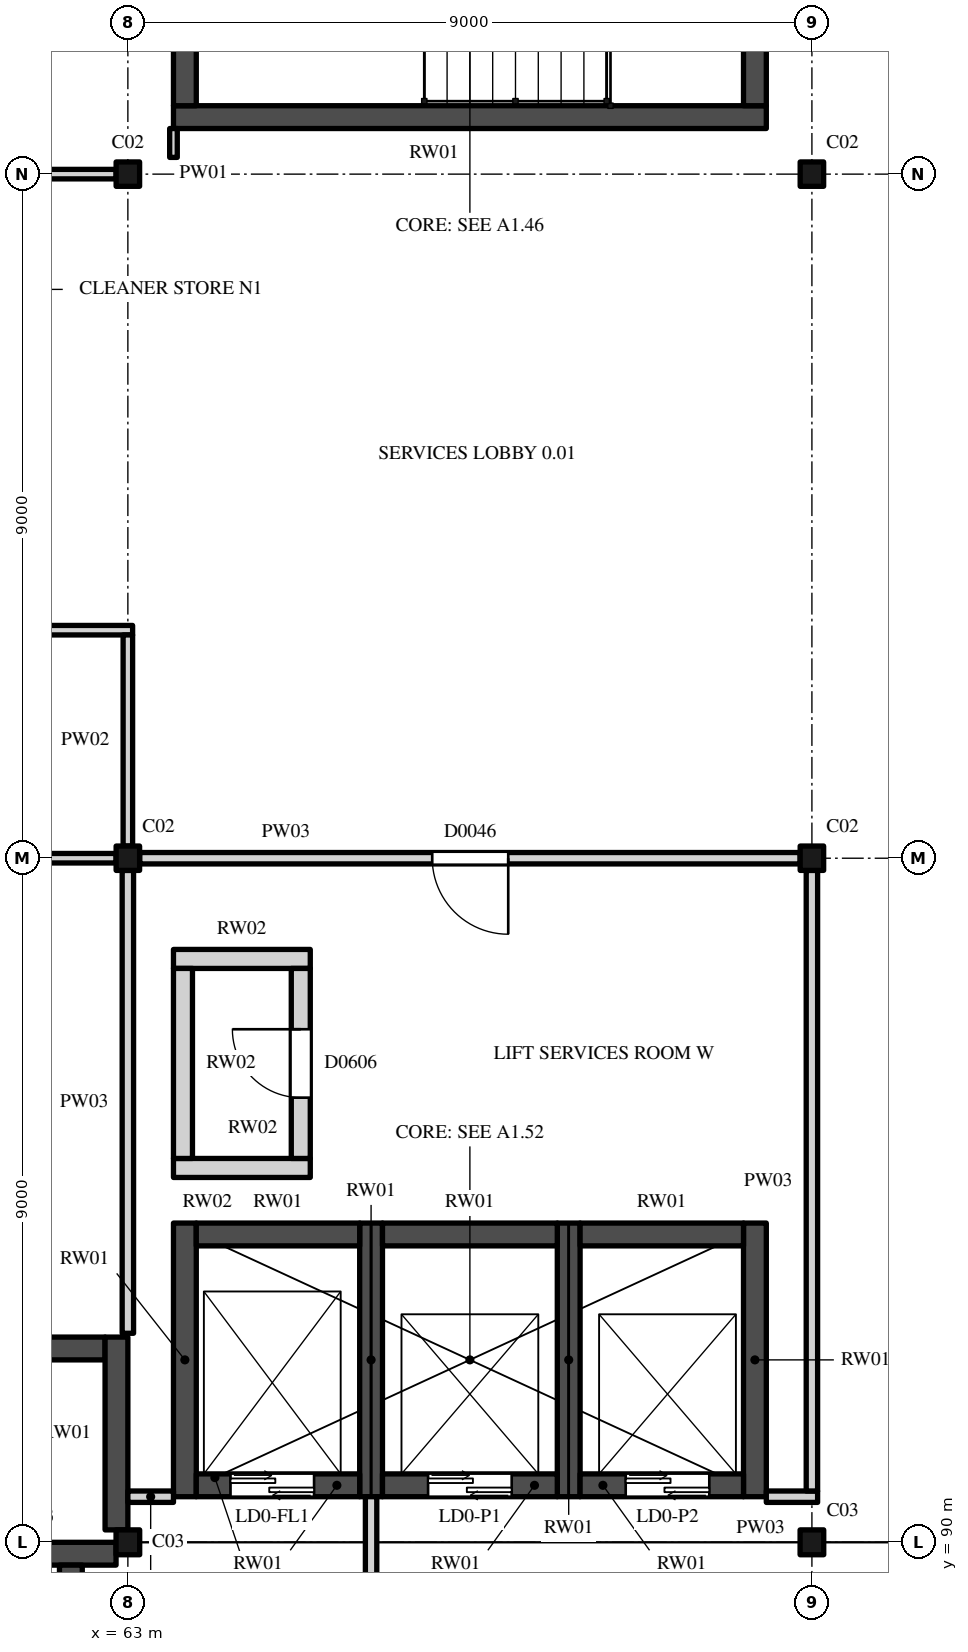
"""IFC4 building model, lengths in metres.
Left out: names, types, materials, properties, quantities, classifications, styles, units other than length and angle.
Written with IfcOpenShell. Run it as: python <this file> out.ifc"""

import sys

from ifc_helpers import new_model, si_unit, direction, frame, frame_2d, origin, origin_2d, place, context, subcontext, project, spatial, rectangle, i_section, extrude, element, fill, save


model = new_model("IFC4")
c1 = context("Model", 3, precision=1e-05, world=origin(), true_north=direction((0.0, 1.0)))
c2 = subcontext(c1, "Body", "Model", "MODEL_VIEW")
j1 = project(units=[si_unit("LENGTHUNIT", "METRE"), si_unit("PLANEANGLEUNIT", "RADIAN")], contexts=[c1])
p1 = place(None, origin())
s1 = spatial("IfcSite", under=j1, at=p1, CompositionType="ELEMENT")
p2 = place(p1, origin())
s2 = spatial("IfcBuilding", under=s1, at=p2, CompositionType="ELEMENT")
p3 = place(p2, origin())
s3 = spatial("IfcBuildingStorey", under=s2, at=p3, CompositionType="ELEMENT", Elevation=0.0)
for number, where, z_axis, x_axis in (
    (1, (63.0, 90.0, 0.0), (0.0, 0.0, 1.0), (1.0, 0.0, 0.0)),
    (2, (72.0, 90.0, 0.0), (0.0, 0.0, 1.0), (1.0, 0.0, 0.0)),
):
    element("IfcColumn", number, at=place(p3, frame(where, z_axis=z_axis, x_axis=x_axis)), inside=s3, PredefinedType="COLUMN", context=c2, shape_type="SweptSolid", body=[
        extrude(i_section(OverallWidth=0.311, OverallDepth=0.327, WebThickness=0.016, FlangeThickness=0.025, FilletRadius=0.017, at=origin_2d()), origin(), (0.0, 0.0, 1.0), 6.0),
    ])
for number, where, z_axis, x_axis in (
    (3, (63.0, 99.0, 0.0), (0.0, 0.0, 1.0), (1.0, 0.0, 0.0)),
    (4, (72.0, 99.0, 0.0), (0.0, 0.0, 1.0), (1.0, 0.0, 0.0)),
    (5, (63.0, 108.0, 0.0), (0.0, 0.0, 1.0), (1.0, 0.0, 0.0)),
    (6, (72.0, 108.0, 0.0), (0.0, 0.0, 1.0), (1.0, 0.0, 0.0)),
):
    element("IfcColumn", number, at=place(p3, frame(where, z_axis=z_axis, x_axis=x_axis)), inside=s3, PredefinedType="COLUMN", context=c2, shape_type="SweptSolid", body=[
        extrude(i_section(OverallWidth=0.309, OverallDepth=0.321, WebThickness=0.014, FlangeThickness=0.022, FilletRadius=0.017, at=origin_2d()), origin(), (0.0, 0.0, 1.0), 6.0),
    ])
p4 = place(p3, frame((54.3, 89.85, 0.0), z_axis=(0.0, 0.0, 1.0), x_axis=(1.0, 0.0, 0.0)))
e7 = element("IfcWall", 7, at=p4, inside=s3, PredefinedType="SHEAR", context=c2, shape_type="SweptSolid", body=[
    extrude(rectangle(XDim=8.544, YDim=0.3, at=frame_2d((4.272, 0.0))), origin(), (0.0, 0.0, 1.0), 6.0),
])
p5 = place(p4, frame((6.3, 0.0, 0.0)))
e8 = element("IfcOpeningElement", 8, at=p5, cuts=e7, PredefinedType="OPENING", context=c2, shape_type="SweptSolid", body=[
    extrude(rectangle(XDim=1.2, YDim=2.1, at=frame_2d((0.6, 1.05))), frame((0.0, 0.16, 0.0), z_axis=(0.0, -1.0, 0.0), x_axis=(1.0, 0.0, 0.0)), (0.0, 0.0, 1.0), 0.32),
])
p6 = place(p3, frame((62.25, 81.9, 0.0), z_axis=(0.0, 0.0, 1.0), x_axis=(0.0, 1.0, 0.0)))
e9 = element("IfcWall", 9, at=p6, inside=s3, PredefinedType="SHEAR", context=c2, shape_type="SweptSolid", body=[
    extrude(rectangle(XDim=7.8, YDim=0.3, at=frame_2d((3.9, 0.0))), origin(), (0.0, 0.0, 1.0), 6.0),
])
p7 = place(p6, frame((3.0, 0.0, 0.0)))
e10 = element("IfcOpeningElement", 10, at=p7, cuts=e9, PredefinedType="OPENING", context=c2, shape_type="SweptSolid", body=[
    extrude(rectangle(XDim=1.2, YDim=2.1, at=frame_2d((0.6, 1.05))), frame((0.0, 0.16, 0.0), z_axis=(0.0, -1.0, 0.0), x_axis=(1.0, 0.0, 0.0)), (0.0, 0.0, 1.0), 0.32),
])
p8 = place(p3, frame((63.6, 108.75, 0.0), z_axis=(0.0, 0.0, 1.0), x_axis=(1.0, 0.0, 0.0)))
e11 = element("IfcWall", 11, at=p8, inside=s3, PredefinedType="SHEAR", context=c2, shape_type="SweptSolid", body=[
    extrude(rectangle(XDim=7.8, YDim=0.3, at=frame_2d((3.9, 0.0))), origin(), (0.0, 0.0, 1.0), 6.0),
])
p9 = place(p3, frame((63.75, 108.9, 0.0), z_axis=(0.0, 0.0, 1.0), x_axis=(0.0, 1.0, 0.0)))
e12 = element("IfcWall", 12, at=p9, inside=s3, PredefinedType="SHEAR", context=c2, shape_type="SweptSolid", body=[
    extrude(rectangle(XDim=7.8, YDim=0.3, at=frame_2d((3.9, 0.0))), origin(), (0.0, 0.0, 1.0), 6.0),
])
p10 = place(p3, frame((71.25, 108.9, 0.0), z_axis=(0.0, 0.0, 1.0), x_axis=(0.0, 1.0, 0.0)))
e13 = element("IfcWall", 13, at=p10, inside=s3, PredefinedType="SHEAR", context=c2, shape_type="SweptSolid", body=[
    extrude(rectangle(XDim=7.8, YDim=0.3, at=frame_2d((3.9, 0.0))), origin(), (0.0, 0.0, 1.0), 6.0),
])
p11 = place(p10, frame((3.0, 0.0, 0.0)))
e14 = element("IfcOpeningElement", 14, at=p11, cuts=e13, PredefinedType="OPENING", context=c2, shape_type="SweptSolid", body=[
    extrude(rectangle(XDim=1.2, YDim=2.1, at=frame_2d((0.6, 1.05))), frame((0.0, 0.16, 0.0), z_axis=(0.0, -1.0, 0.0), x_axis=(1.0, 0.0, 0.0)), (0.0, 0.0, 1.0), 0.32),
])
p12 = place(p3, frame((54.3, 92.55, 0.0), z_axis=(0.0, 0.0, 1.0), x_axis=(1.0, 0.0, 0.0)))
e15 = element("IfcWall", 15, at=p12, inside=s3, PredefinedType="SHEAR", context=c2, shape_type="SweptSolid", body=[
    extrude(rectangle(XDim=8.4, YDim=0.3, at=frame_2d((4.2, 0.0))), origin(), (0.0, 0.0, 1.0), 6.0),
])
p13 = place(p3, frame((62.85, 90.164, 0.0), z_axis=(0.0, 0.0, 1.0), x_axis=(0.0, 1.0, 0.0)))
e16 = element("IfcWall", 16, at=p13, inside=s3, PredefinedType="SHEAR", context=c2, shape_type="SweptSolid", body=[
    extrude(rectangle(XDim=2.536, YDim=0.3, at=frame_2d((1.268, 0.0))), origin(), (0.0, 0.0, 1.0), 6.0),
])
for number, where, z_axis, x_axis in (
    (17, (63.75, 90.6, -1.5), (0.0, 0.0, 1.0), (0.0, 1.0, 0.0)),
    (18, (66.2, 90.6, -1.5), (0.0, 0.0, 1.0), (0.0, 1.0, 0.0)),
    (19, (68.8, 90.6, -1.5), (0.0, 0.0, 1.0), (0.0, 1.0, 0.0)),
    (20, (71.25, 90.6, -1.5), (0.0, 0.0, 1.0), (0.0, 1.0, 0.0)),
):
    element("IfcWall", number, at=place(p3, frame(where, z_axis=z_axis, x_axis=x_axis)), inside=s3, PredefinedType="SHEAR", context=c2, shape_type="SweptSolid", body=[
        extrude(rectangle(XDim=3.6, YDim=0.3, at=frame_2d((1.8, 0.0))), origin(), (0.0, 0.0, 1.0), 7.5),
    ])
p14 = place(p3, frame((63.9, 90.75, -1.5), z_axis=(0.0, 0.0, 1.0), x_axis=(1.0, 0.0, 0.0)))
e21 = element("IfcWall", 21, at=p14, inside=s3, PredefinedType="SHEAR", context=c2, shape_type="SweptSolid", body=[
    extrude(rectangle(XDim=2.15, YDim=0.3, at=frame_2d((1.075, 0.0))), origin(), (0.0, 0.0, 1.0), 7.5),
])
p15 = place(p14, frame((0.45, 0.0, 1.5)))
e22 = element("IfcOpeningElement", 22, at=p15, cuts=e21, PredefinedType="OPENING", context=c2, shape_type="SweptSolid", body=[
    extrude(rectangle(XDim=1.1, YDim=2.1, at=frame_2d((0.55, 1.05))), frame((0.0, 0.16, 0.0), z_axis=(0.0, -1.0, 0.0), x_axis=(1.0, 0.0, 0.0)), (0.0, 0.0, 1.0), 0.32),
])
p16 = place(p3, frame((63.9, 94.05, -1.5), z_axis=(0.0, 0.0, 1.0), x_axis=(1.0, 0.0, 0.0)))
e23 = element("IfcWall", 23, at=p16, inside=s3, PredefinedType="SHEAR", context=c2, shape_type="SweptSolid", body=[
    extrude(rectangle(XDim=2.15, YDim=0.3, at=frame_2d((1.075, 0.0))), origin(), (0.0, 0.0, 1.0), 7.5),
])
p17 = place(p3, frame((66.35, 90.75, -1.5), z_axis=(0.0, 0.0, 1.0), x_axis=(1.0, 0.0, 0.0)))
e24 = element("IfcWall", 24, at=p17, inside=s3, PredefinedType="SHEAR", context=c2, shape_type="SweptSolid", body=[
    extrude(rectangle(XDim=2.3, YDim=0.3, at=frame_2d((1.15, 0.0))), origin(), (0.0, 0.0, 1.0), 7.5),
])
p18 = place(p17, frame((0.6, 0.0, 1.5)))
e25 = element("IfcOpeningElement", 25, at=p18, cuts=e24, PredefinedType="OPENING", context=c2, shape_type="SweptSolid", body=[
    extrude(rectangle(XDim=1.1, YDim=2.1, at=frame_2d((0.55, 1.05))), frame((0.0, 0.16, 0.0), z_axis=(0.0, -1.0, 0.0), x_axis=(1.0, 0.0, 0.0)), (0.0, 0.0, 1.0), 0.32),
])
p19 = place(p3, frame((66.35, 94.05, -1.5), z_axis=(0.0, 0.0, 1.0), x_axis=(1.0, 0.0, 0.0)))
e26 = element("IfcWall", 26, at=p19, inside=s3, PredefinedType="SHEAR", context=c2, shape_type="SweptSolid", body=[
    extrude(rectangle(XDim=2.3, YDim=0.3, at=frame_2d((1.15, 0.0))), origin(), (0.0, 0.0, 1.0), 7.5),
])
p20 = place(p3, frame((68.95, 90.75, -1.5), z_axis=(0.0, 0.0, 1.0), x_axis=(1.0, 0.0, 0.0)))
e27 = element("IfcWall", 27, at=p20, inside=s3, PredefinedType="SHEAR", context=c2, shape_type="SweptSolid", body=[
    extrude(rectangle(XDim=2.15, YDim=0.3, at=frame_2d((1.075, 0.0))), origin(), (0.0, 0.0, 1.0), 7.5),
])
p21 = place(p20, frame((0.6, 0.0, 1.5)))
e28 = element("IfcOpeningElement", 28, at=p21, cuts=e27, PredefinedType="OPENING", context=c2, shape_type="SweptSolid", body=[
    extrude(rectangle(XDim=1.1, YDim=2.1, at=frame_2d((0.55, 1.05))), frame((0.0, 0.16, 0.0), z_axis=(0.0, -1.0, 0.0), x_axis=(1.0, 0.0, 0.0)), (0.0, 0.0, 1.0), 0.32),
])
p22 = place(p3, frame((68.95, 94.05, -1.5), z_axis=(0.0, 0.0, 1.0), x_axis=(1.0, 0.0, 0.0)))
e29 = element("IfcWall", 29, at=p22, inside=s3, PredefinedType="SHEAR", context=c2, shape_type="SweptSolid", body=[
    extrude(rectangle(XDim=2.15, YDim=0.3, at=frame_2d((1.075, 0.0))), origin(), (0.0, 0.0, 1.0), 7.5),
])
for number, where, z_axis, x_axis in (
    (30, (63.6, 94.925, 0.0), (0.0, 0.0, 1.0), (1.0, 0.0, 0.0)),
    (31, (63.6, 97.675, 0.0), (0.0, 0.0, 1.0), (1.0, 0.0, 0.0)),
):
    element("IfcWall", number, at=place(p3, frame(where, z_axis=z_axis, x_axis=x_axis)), inside=s3, PredefinedType="STANDARD", context=c2, shape_type="SweptSolid", body=[
        extrude(rectangle(XDim=1.8, YDim=0.25, at=frame_2d((0.9, 0.0))), origin(), (0.0, 0.0, 1.0), 6.0),
    ])
p23 = place(p3, frame((63.725, 95.05, 0.0), z_axis=(0.0, 0.0, 1.0), x_axis=(0.0, 1.0, 0.0)))
e32 = element("IfcWall", 32, at=p23, inside=s3, PredefinedType="STANDARD", context=c2, shape_type="SweptSolid", body=[
    extrude(rectangle(XDim=2.5, YDim=0.25, at=frame_2d((1.25, 0.0))), origin(), (0.0, 0.0, 1.0), 6.0),
])
p24 = place(p3, frame((65.275, 95.05, 0.0), z_axis=(0.0, 0.0, 1.0), x_axis=(0.0, 1.0, 0.0)))
e33 = element("IfcWall", 33, at=p24, inside=s3, PredefinedType="STANDARD", context=c2, shape_type="SweptSolid", body=[
    extrude(rectangle(XDim=2.5, YDim=0.25, at=frame_2d((1.25, 0.0))), origin(), (0.0, 0.0, 1.0), 6.0),
])
p25 = place(p24, frame((0.8, 0.0, 0.0)))
e34 = element("IfcOpeningElement", 34, at=p25, cuts=e33, PredefinedType="OPENING", context=c2, shape_type="SweptSolid", body=[
    extrude(rectangle(XDim=0.9, YDim=2.1, at=frame_2d((0.45, 1.05))), frame((0.0, 0.135, 0.0), z_axis=(0.0, -1.0, 0.0), x_axis=(1.0, 0.0, 0.0)), (0.0, 0.0, 1.0), 0.27),
])
p26 = place(p3, frame((63.0, 90.6, 0.0), z_axis=(0.0, 0.0, 1.0), x_axis=(1.0, 0.0, 0.0)))
e35 = element("IfcWall", 35, at=p26, inside=s3, PredefinedType="PARTITIONING", context=c2, shape_type="SweptSolid", body=[
    extrude(rectangle(XDim=0.6, YDim=0.15, at=frame_2d((0.3, 0.0))), origin(), (0.0, 0.0, 1.0), 5.825),
])
p27 = place(p3, frame((71.4, 90.6, 0.0), z_axis=(0.0, 0.0, 1.0), x_axis=(1.0, 0.0, 0.0)))
e36 = element("IfcWall", 36, at=p27, inside=s3, PredefinedType="PARTITIONING", context=c2, shape_type="SweptSolid", body=[
    extrude(rectangle(XDim=0.675, YDim=0.15, at=frame_2d((0.337, 0.0))), origin(), (0.0, 0.0, 1.0), 5.825),
])
p28 = place(p3, frame((57.538, 99.0, 0.0), z_axis=(0.0, 0.0, 1.0), x_axis=(1.0, 0.0, 0.0)))
e37 = element("IfcWall", 37, at=p28, inside=s3, PredefinedType="PARTITIONING", context=c2, shape_type="SweptSolid", body=[
    extrude(rectangle(XDim=5.307, YDim=0.125, at=frame_2d((2.654, 0.0))), origin(), (0.0, 0.0, 1.0), 5.466),
])
p29 = place(p3, frame((63.155, 99.0, 0.0), z_axis=(0.0, 0.0, 1.0), x_axis=(1.0, 0.0, 0.0)))
e38 = element("IfcWall", 38, at=p29, inside=s3, PredefinedType="PARTITIONING", context=c2, shape_type="SweptSolid", body=[
    extrude(rectangle(XDim=8.691, YDim=0.15, at=frame_2d((4.345, 0.0))), origin(), (0.0, 0.0, 1.0), 5.466),
])
p30 = place(p29, frame((3.85, 0.0, 0.0)))
e39 = element("IfcOpeningElement", 39, at=p30, cuts=e38, PredefinedType="OPENING", context=c2, shape_type="SweptSolid", body=[
    extrude(rectangle(XDim=1.0, YDim=2.4, at=frame_2d((0.5, 1.2))), frame((0.0, 0.085, 0.0), z_axis=(0.0, -1.0, 0.0), x_axis=(1.0, 0.0, 0.0)), (0.0, 0.0, 1.0), 0.17),
])
p31 = place(p3, frame((54.45, 102.0, 0.0), z_axis=(0.0, 0.0, 1.0), x_axis=(1.0, 0.0, 0.0)))
e40 = element("IfcWall", 40, at=p31, inside=s3, PredefinedType="PARTITIONING", context=c2, shape_type="SweptSolid", body=[
    extrude(rectangle(XDim=8.613, YDim=0.125, at=frame_2d((4.306, 0.0))), origin(), (0.0, 0.0, 1.0), 5.473),
])
p32 = place(p31, frame((1.15, 0.0, 0.0)))
e41 = element("IfcOpeningElement", 41, at=p32, cuts=e40, PredefinedType="OPENING", context=c2, shape_type="SweptSolid", body=[
    extrude(rectangle(XDim=0.9, YDim=2.1, at=frame_2d((0.45, 1.05))), frame((0.0, 0.073, 0.0), z_axis=(0.0, -1.0, 0.0), x_axis=(1.0, 0.0, 0.0)), (0.0, 0.0, 1.0), 0.145),
])
p33 = place(p31, frame((5.4, 0.0, 0.0)))
e42 = element("IfcOpeningElement", 42, at=p33, cuts=e40, PredefinedType="OPENING", context=c2, shape_type="SweptSolid", body=[
    extrude(rectangle(XDim=0.9, YDim=2.1, at=frame_2d((0.45, 1.05))), frame((0.0, 0.073, 0.0), z_axis=(0.0, -1.0, 0.0), x_axis=(1.0, 0.0, 0.0)), (0.0, 0.0, 1.0), 0.145),
])
p34 = place(p3, frame((54.45, 108.0, 0.0), z_axis=(0.0, 0.0, 1.0), x_axis=(1.0, 0.0, 0.0)))
e43 = element("IfcWall", 43, at=p34, inside=s3, PredefinedType="PARTITIONING", context=c2, shape_type="SweptSolid", body=[
    extrude(rectangle(XDim=8.396, YDim=0.125, at=frame_2d((4.198, 0.0))), origin(), (0.0, 0.0, 1.0), 5.466),
])
p35 = place(p34, frame((6.5, 0.0, 0.0)))
e44 = element("IfcOpeningElement", 44, at=p35, cuts=e43, PredefinedType="OPENING", context=c2, shape_type="SweptSolid", body=[
    extrude(rectangle(XDim=1.0, YDim=2.1, at=frame_2d((0.5, 1.05))), frame((0.0, 0.073, 0.0), z_axis=(0.0, -1.0, 0.0), x_axis=(1.0, 0.0, 0.0)), (0.0, 0.0, 1.0), 0.145),
])
p36 = place(p3, frame((63.0, 92.75, 0.0), z_axis=(0.0, 0.0, 1.0), x_axis=(0.0, 1.0, 0.0)))
e45 = element("IfcWall", 45, at=p36, inside=s3, PredefinedType="PARTITIONING", context=c2, shape_type="SweptSolid", body=[
    extrude(rectangle(XDim=6.09, YDim=0.15, at=frame_2d((3.045, 0.0))), origin(), (0.0, 0.0, 1.0), 5.365),
])
p37 = place(p3, frame((63.0, 99.16, 0.0), z_axis=(0.0, 0.0, 1.0), x_axis=(0.0, 1.0, 0.0)))
e46 = element("IfcWall", 46, at=p37, inside=s3, PredefinedType="PARTITIONING", context=c2, shape_type="SweptSolid", body=[
    extrude(rectangle(XDim=2.777, YDim=0.125, at=frame_2d((1.389, 0.0))), origin(), (0.0, 0.0, 1.0), 5.365),
])
p38 = place(p3, frame((63.6, 108.22, 0.0), z_axis=(0.0, 0.0, 1.0), x_axis=(0.0, 1.0, 0.0)))
e47 = element("IfcWall", 47, at=p38, inside=s3, PredefinedType="PARTITIONING", context=c2, shape_type="SweptSolid", body=[
    extrude(rectangle(XDim=0.38, YDim=0.1, at=frame_2d((0.19, 0.0))), origin(), (0.0, 0.0, 1.0), 5.825),
])
p39 = place(p3, frame((66.2, 84.075, 0.0), z_axis=(0.0, 0.0, 1.0), x_axis=(0.0, 1.0, 0.0)))
e48 = element("IfcWall", 48, at=p39, inside=s3, PredefinedType="PARTITIONING", context=c2, shape_type="SweptSolid", body=[
    extrude(rectangle(XDim=6.525, YDim=0.15, at=frame_2d((3.263, 0.0))), origin(), (0.0, 0.0, 1.0), 5.825),
])
p40 = place(p39, frame((2.85, 0.0, 0.0)))
e49 = element("IfcOpeningElement", 49, at=p40, cuts=e48, PredefinedType="OPENING", context=c2, shape_type="SweptSolid", body=[
    extrude(rectangle(XDim=0.9, YDim=2.1, at=frame_2d((0.45, 1.05))), frame((0.0, 0.085, 0.0), z_axis=(0.0, -1.0, 0.0), x_axis=(1.0, 0.0, 0.0)), (0.0, 0.0, 1.0), 0.17),
])
p41 = place(p3, frame((72.0, 90.675, 0.0), z_axis=(0.0, 0.0, 1.0), x_axis=(0.0, 1.0, 0.0)))
e50 = element("IfcWall", 50, at=p41, inside=s3, PredefinedType="PARTITIONING", context=c2, shape_type="SweptSolid", body=[
    extrude(rectangle(XDim=8.165, YDim=0.15, at=frame_2d((4.082, 0.0))), origin(), (0.0, 0.0, 1.0), 5.365),
])
p42 = place(p15, origin())
e51 = element("IfcDoor", 51, at=p42, inside=s3, OperationType="DOUBLE_DOOR_SLIDING", PredefinedType="DOOR", context=c2, shape_type="SweptSolid", body=[
    extrude(rectangle(XDim=1.1, YDim=2.1, at=frame_2d((0.55, 1.05))), frame((0.0, 0.025, 0.0), z_axis=(0.0, -1.0, 0.0), x_axis=(1.0, 0.0, 0.0)), (0.0, 0.0, 1.0), 0.05),
])
fill(e22, e51)
p43 = place(p18, origin())
e52 = element("IfcDoor", 52, at=p43, inside=s3, OperationType="DOUBLE_DOOR_SLIDING", PredefinedType="DOOR", context=c2, shape_type="SweptSolid", body=[
    extrude(rectangle(XDim=1.1, YDim=2.1, at=frame_2d((0.55, 1.05))), frame((0.0, 0.025, 0.0), z_axis=(0.0, -1.0, 0.0), x_axis=(1.0, 0.0, 0.0)), (0.0, 0.0, 1.0), 0.05),
])
fill(e25, e52)
p44 = place(p21, origin())
e53 = element("IfcDoor", 53, at=p44, inside=s3, OperationType="DOUBLE_DOOR_SLIDING", PredefinedType="DOOR", context=c2, shape_type="SweptSolid", body=[
    extrude(rectangle(XDim=1.1, YDim=2.1, at=frame_2d((0.55, 1.05))), frame((0.0, 0.025, 0.0), z_axis=(0.0, -1.0, 0.0), x_axis=(1.0, 0.0, 0.0)), (0.0, 0.0, 1.0), 0.05),
])
fill(e28, e53)
p45 = place(p25, origin())
e54 = element("IfcDoor", 54, at=p45, inside=s3, OperationType="SINGLE_SWING_LEFT", PredefinedType="DOOR", context=c2, shape_type="SweptSolid", body=[
    extrude(rectangle(XDim=0.9, YDim=2.1, at=frame_2d((0.45, 1.05))), frame((0.0, 0.025, 0.0), z_axis=(0.0, -1.0, 0.0), x_axis=(1.0, 0.0, 0.0)), (0.0, 0.0, 1.0), 0.05),
])
fill(e34, e54)
p46 = place(p30, origin())
e55 = element("IfcDoor", 55, at=p46, inside=s3, OperationType="SINGLE_SWING_RIGHT", PredefinedType="DOOR", context=c2, shape_type="SweptSolid", body=[
    extrude(rectangle(XDim=1.0, YDim=2.4, at=frame_2d((0.5, 1.2))), frame((0.0, 0.025, 0.0), z_axis=(0.0, -1.0, 0.0), x_axis=(1.0, 0.0, 0.0)), (0.0, 0.0, 1.0), 0.05),
])
fill(e39, e55)
save(model, sys.argv[1])
